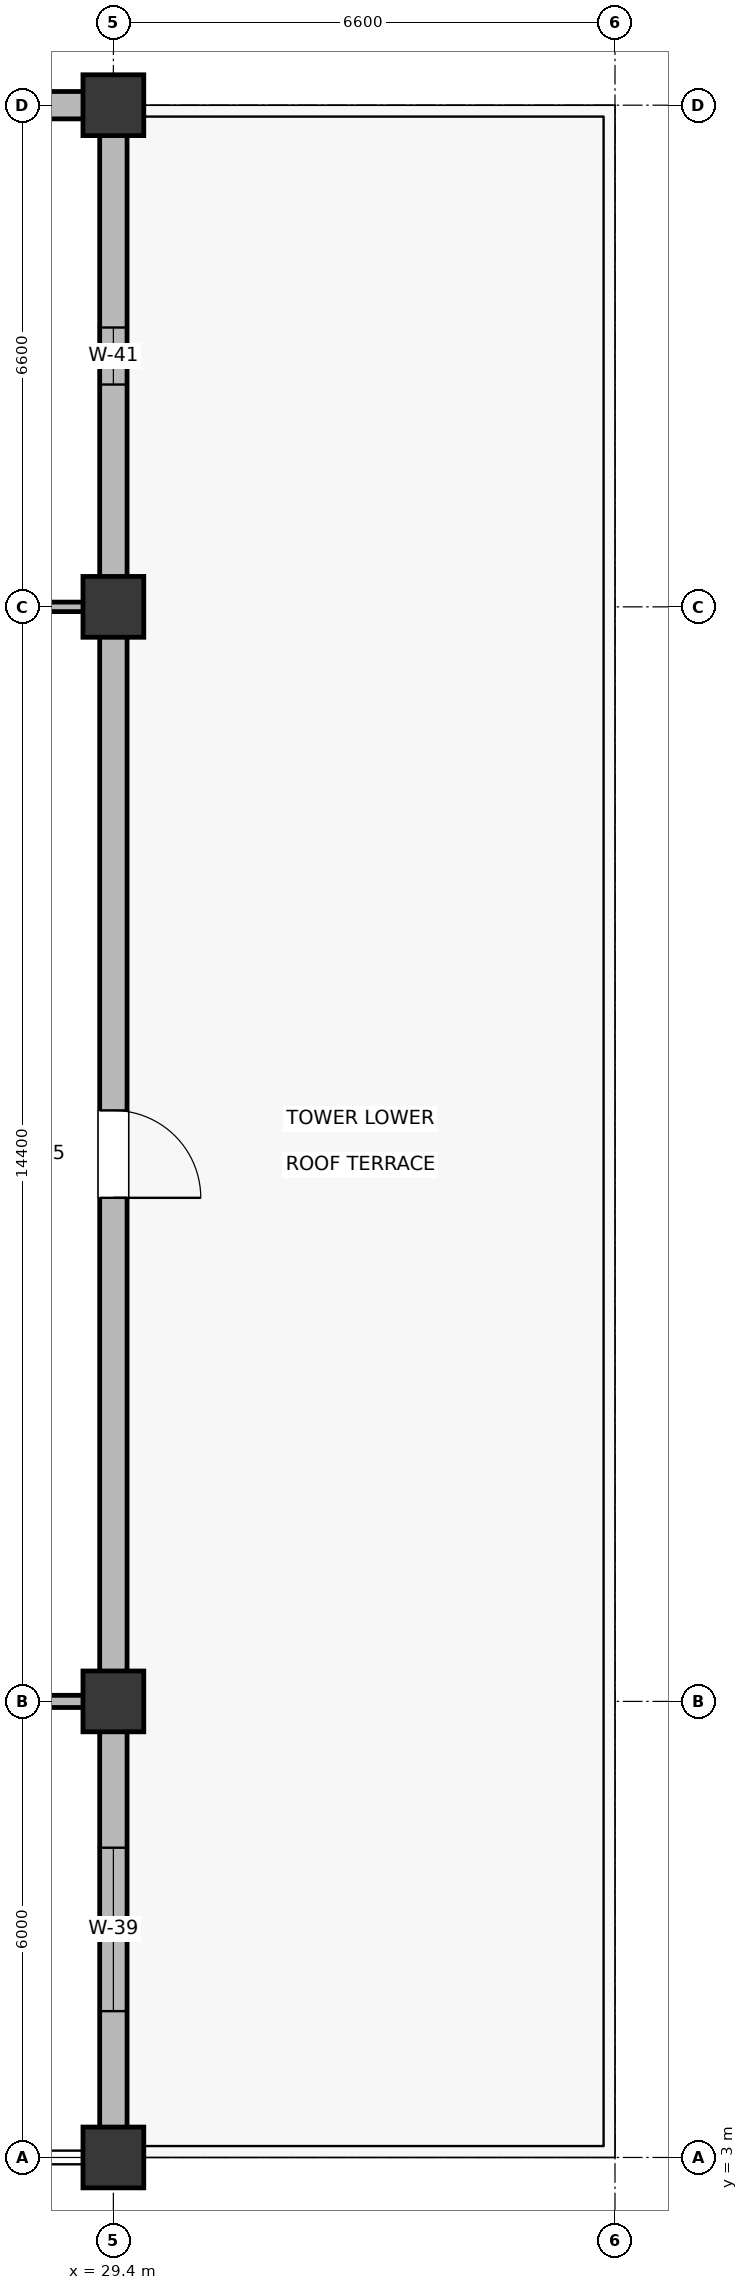
"""IFC4 building model, lengths in metres.
Left out: names, types, materials, properties, quantities, classifications, styles, units other than length and angle.
Written with IfcOpenShell. Run it as: python <this file> out.ifc"""

import sys

from ifc_helpers import new_model, si_unit, direction, frame, frame_2d, origin, origin_2d, place, context, subcontext, project, spatial, rectangle, extrude, element, fill, save


model = new_model("IFC4")
c1 = context("Model", 3, precision=1e-05, world=origin(), true_north=direction((0.0, 1.0)))
c2 = subcontext(c1, "Body", "Model", "MODEL_VIEW")
j1 = project(units=[si_unit("LENGTHUNIT", "METRE"), si_unit("PLANEANGLEUNIT", "RADIAN")], contexts=[c1])
p1 = place(None, origin())
s1 = spatial("IfcSite", under=j1, at=p1, CompositionType="ELEMENT")
p2 = place(p1, origin())
s2 = spatial("IfcBuilding", under=s1, at=p2, CompositionType="ELEMENT")
p3 = place(p2, frame((0.0, 0.0, 28.5)))
s3 = spatial("IfcBuildingStorey", under=s2, at=p3, CompositionType="ELEMENT", Elevation=28.5)
for number, where, z_axis, x_axis in (
    (1, (29.4, 3.0, 0.0), (0.0, 0.0, 1.0), (1.0, 0.0, 0.0)),
    (2, (29.4, 9.0, 0.0), (0.0, 0.0, 1.0), (1.0, 0.0, 0.0)),
    (3, (29.4, 23.4, 0.0), (0.0, 0.0, 1.0), (1.0, 0.0, 0.0)),
    (4, (29.4, 30.0, 0.0), (0.0, 0.0, 1.0), (1.0, 0.0, 0.0)),
):
    element("IfcColumn", number, at=place(p3, frame(where, z_axis=z_axis, x_axis=x_axis)), inside=s3, PredefinedType="COLUMN", context=c2, shape_type="SweptSolid", body=[
        extrude(rectangle(XDim=0.8, YDim=0.8, at=origin_2d()), origin(), (0.0, 0.0, 1.0), 4.5),
    ])
p4 = place(p3, frame((29.4, 3.385, 0.0), z_axis=(0.0, 0.0, 1.0), x_axis=(0.0, 1.0, 0.0)))
e5 = element("IfcWall", 5, at=p4, inside=s3, PredefinedType="SOLIDWALL", context=c2, shape_type="SweptSolid", body=[
    extrude(rectangle(XDim=5.23, YDim=0.36, at=frame_2d((2.615, 0.0))), origin(), (0.0, 0.0, 1.0), 3.625),
])
p5 = place(p4, frame((1.54, 0.0, 0.9)))
e6 = element("IfcOpeningElement", 6, at=p5, cuts=e5, PredefinedType="OPENING", context=c2, shape_type="SweptSolid", body=[
    extrude(rectangle(XDim=2.15, YDim=1.7, at=frame_2d((1.075, 0.85))), frame((0.0, 0.19, 0.0), z_axis=(0.0, -1.0, 0.0), x_axis=(1.0, 0.0, 0.0)), (0.0, 0.0, 1.0), 0.38),
])
p6 = place(p3, frame((29.4, 9.385, 0.0), z_axis=(0.0, 0.0, 1.0), x_axis=(0.0, 1.0, 0.0)))
e7 = element("IfcWall", 7, at=p6, inside=s3, PredefinedType="SOLIDWALL", context=c2, shape_type="SweptSolid", body=[
    extrude(rectangle(XDim=13.63, YDim=0.36, at=frame_2d((6.815, 0.0))), origin(), (0.0, 0.0, 1.0), 3.425),
])
p7 = place(p6, frame((6.24, 0.0, 0.0)))
e8 = element("IfcOpeningElement", 8, at=p7, cuts=e7, PredefinedType="OPENING", context=c2, shape_type="SweptSolid", body=[
    extrude(rectangle(XDim=1.15, YDim=2.2, at=frame_2d((0.575, 1.1))), frame((0.0, 0.19, 0.0), z_axis=(0.0, -1.0, 0.0), x_axis=(1.0, 0.0, 0.0)), (0.0, 0.0, 1.0), 0.38),
])
p8 = place(p3, frame((29.4, 23.785, 0.0), z_axis=(0.0, 0.0, 1.0), x_axis=(0.0, 1.0, 0.0)))
e9 = element("IfcWall", 9, at=p8, inside=s3, PredefinedType="SOLIDWALL", context=c2, shape_type="SweptSolid", body=[
    extrude(rectangle(XDim=5.83, YDim=0.36, at=frame_2d((2.915, 0.0))), origin(), (0.0, 0.0, 1.0), 3.625),
])
p9 = place(p8, frame((2.54, 0.0, 0.9)))
e10 = element("IfcOpeningElement", 10, at=p9, cuts=e9, PredefinedType="OPENING", context=c2, shape_type="SweptSolid", body=[
    extrude(rectangle(XDim=0.75, YDim=1.15, at=frame_2d((0.375, 0.575))), frame((0.0, 0.19, 0.0), z_axis=(0.0, -1.0, 0.0), x_axis=(1.0, 0.0, 0.0)), (0.0, 0.0, 1.0), 0.38),
])
p10 = place(p3, frame((23.185, 30.0, 0.0), z_axis=(0.0, 0.0, 1.0), x_axis=(1.0, 0.0, 0.0)))
e11 = element("IfcWall", 11, at=p10, inside=s3, PredefinedType="SOLIDWALL", context=c2, shape_type="SweptSolid", body=[
    extrude(rectangle(XDim=5.83, YDim=0.36, at=frame_2d((2.915, 0.0))), origin(), (0.0, 0.0, 1.0), 3.525),
])
p11 = place(p10, frame((2.44, 0.0, 0.9)))
e12 = element("IfcOpeningElement", 12, at=p11, cuts=e11, PredefinedType="OPENING", context=c2, shape_type="SweptSolid", body=[
    extrude(rectangle(XDim=0.95, YDim=1.15, at=frame_2d((0.475, 0.575))), frame((0.0, 0.19, 0.0), z_axis=(0.0, -1.0, 0.0), x_axis=(1.0, 0.0, 0.0)), (0.0, 0.0, 1.0), 0.38),
])
p12 = place(p3, frame((24.03, 9.0, 0.0), z_axis=(0.0, 0.0, 1.0), x_axis=(1.0, 0.0, 0.0)))
e13 = element("IfcWall", 13, at=p12, inside=s3, PredefinedType="PARTITIONING", context=c2, shape_type="SweptSolid", body=[
    extrude(rectangle(XDim=5.14, YDim=0.16, at=frame_2d((2.57, 0.0))), origin(), (0.0, 0.0, 1.0), 3.525),
])
p13 = place(p3, frame((24.03, 23.4, 0.0), z_axis=(0.0, 0.0, 1.0), x_axis=(1.0, 0.0, 0.0)))
e14 = element("IfcWall", 14, at=p13, inside=s3, PredefinedType="PARTITIONING", context=c2, shape_type="SweptSolid", body=[
    extrude(rectangle(XDim=5.14, YDim=0.125, at=frame_2d((2.57, 0.0))), origin(), (0.0, 0.0, 1.0), 3.525),
])
p14 = place(p5, frame((2.15, 0.0, 0.0), z_axis=(0.0, 0.0, 1.0), x_axis=(-1.0, 0.0, 0.0)))
e15 = element("IfcWindow", 15, at=p14, inside=s3, PartitioningType="DOUBLE_PANEL_VERTICAL", PredefinedType="WINDOW", context=c2, shape_type="SweptSolid", body=[
    extrude(rectangle(XDim=2.15, YDim=1.7, at=frame_2d((1.075, 0.85))), frame((0.0, 0.03, 0.0), z_axis=(0.0, -1.0, 0.0), x_axis=(1.0, 0.0, 0.0)), (0.0, 0.0, 1.0), 0.06),
])
fill(e6, e15)
p15 = place(p7, frame((1.15, 0.0, 0.0), z_axis=(0.0, 0.0, 1.0), x_axis=(-1.0, 0.0, 0.0)))
e16 = element("IfcDoor", 16, at=p15, inside=s3, OperationType="SINGLE_SWING_LEFT", PredefinedType="DOOR", context=c2, shape_type="SweptSolid", body=[
    extrude(rectangle(XDim=1.15, YDim=2.2, at=frame_2d((0.575, 1.1))), frame((0.0, 0.025, 0.0), z_axis=(0.0, -1.0, 0.0), x_axis=(1.0, 0.0, 0.0)), (0.0, 0.0, 1.0), 0.05),
])
fill(e8, e16)
p16 = place(p9, frame((0.75, 0.0, 0.0), z_axis=(0.0, 0.0, 1.0), x_axis=(-1.0, 0.0, 0.0)))
e17 = element("IfcWindow", 17, at=p16, inside=s3, PartitioningType="DOUBLE_PANEL_VERTICAL", PredefinedType="WINDOW", context=c2, shape_type="SweptSolid", body=[
    extrude(rectangle(XDim=0.75, YDim=1.15, at=frame_2d((0.375, 0.575))), frame((0.0, 0.03, 0.0), z_axis=(0.0, -1.0, 0.0), x_axis=(1.0, 0.0, 0.0)), (0.0, 0.0, 1.0), 0.06),
])
fill(e10, e17)
save(model, sys.argv[1])
